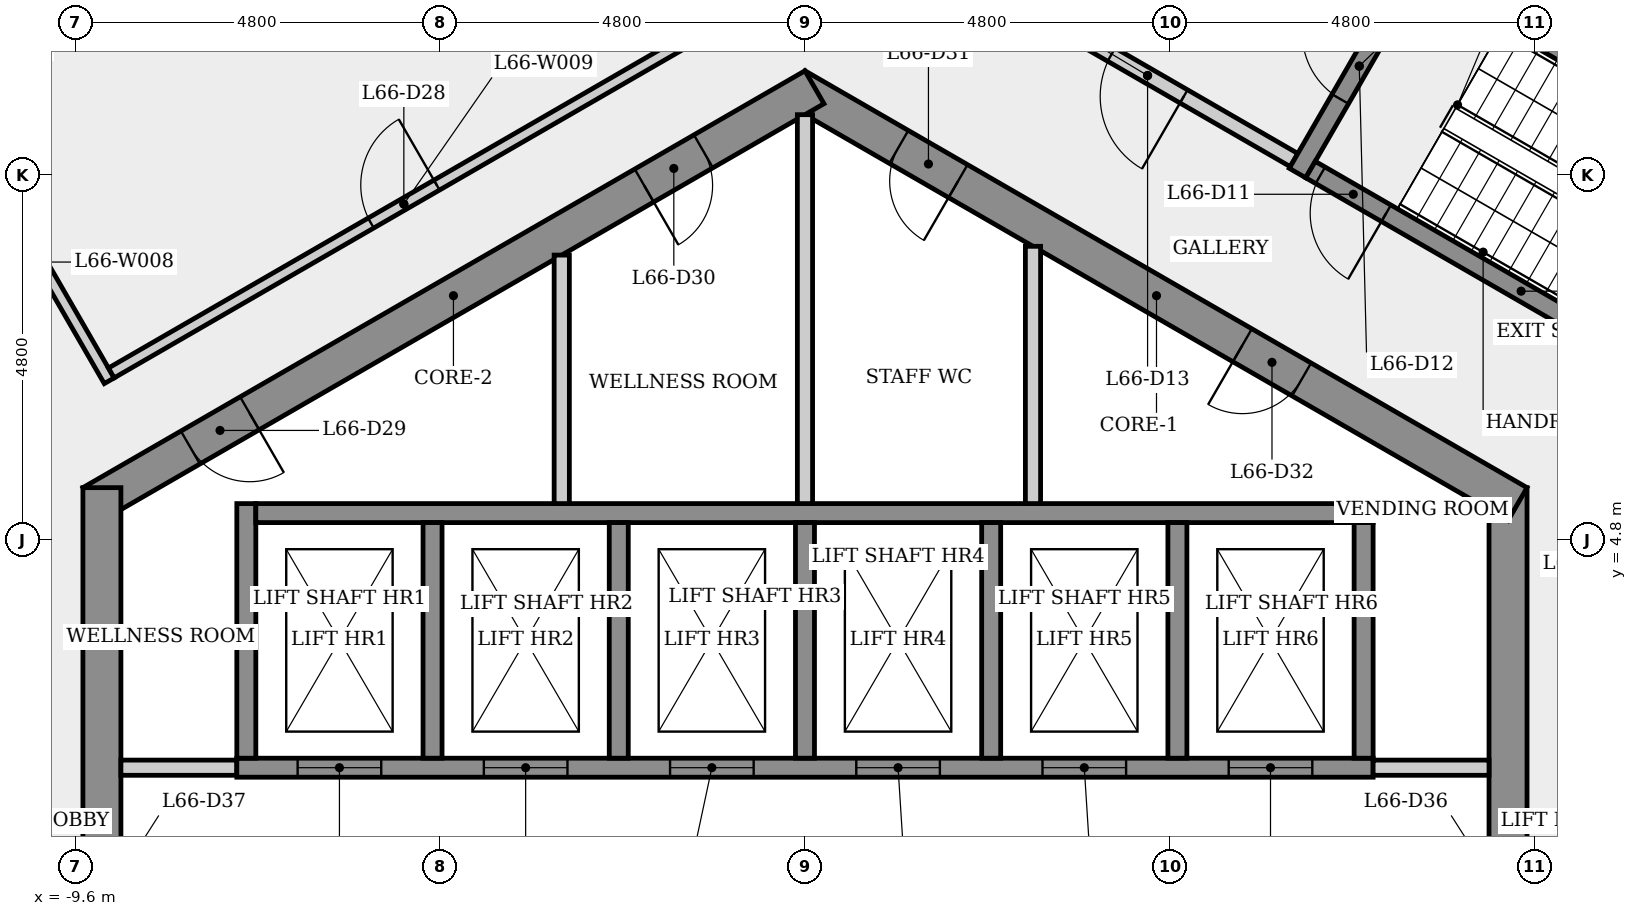
"""IFC4 building model, lengths in metres.
Left out: names, types, materials, properties, quantities, classifications, styles, units other than length and angle.
Written with IfcOpenShell. Run it as: python <this file> out.ifc"""

import sys

from ifc_helpers import new_model, si_unit, direction, frame, frame_2d, origin, place, context, subcontext, project, spatial, rectangle, extrude, element, fill, save


model = new_model("IFC4")
c1 = context("Model", 3, precision=1e-05, world=origin(), true_north=direction((0.0, 1.0)))
c2 = subcontext(c1, "Body", "Model", "MODEL_VIEW")
j1 = project(units=[si_unit("LENGTHUNIT", "METRE"), si_unit("PLANEANGLEUNIT", "RADIAN")], contexts=[c1])
p1 = place(None, origin())
s1 = spatial("IfcSite", under=j1, at=p1, CompositionType="ELEMENT")
p2 = place(p1, origin())
s2 = spatial("IfcBuilding", under=s1, at=p2, CompositionType="ELEMENT")
p3 = place(p2, frame((0.0, 0.0, 246.1)))
s3 = spatial("IfcBuildingStorey", under=s2, at=p3, CompositionType="ELEMENT", Elevation=246.1)
p4 = place(p3, frame((9.25, -5.485, 0.0), z_axis=(0.0, 0.0, 1.0), x_axis=(0.0, 1.0, 0.0)))
e1 = element("IfcWall", 1, at=p4, inside=s3, PredefinedType="SHEAR", context=c2, shape_type="SweptSolid", body=[
    extrude(rectangle(XDim=10.97, YDim=0.5, at=frame_2d((5.485, 0.0))), origin(), (0.0, 0.0, 1.0), 3.4),
])
p5 = place(p4, frame((4.685, 0.0, 0.0)))
e2 = element("IfcOpeningElement", 2, at=p5, cuts=e1, PredefinedType="OPENING", context=c2, shape_type="SweptSolid", body=[
    extrude(rectangle(XDim=1.6, YDim=2.1, at=frame_2d((0.8, 1.05))), frame((0.0, 0.26, 0.0), z_axis=(0.0, -1.0, 0.0), x_axis=(1.0, 0.0, 0.0)), (0.0, 0.0, 1.0), 0.52),
])
p6 = place(p3, frame((9.375, 5.268, 0.0), z_axis=(0.0, 0.0, 1.0), x_axis=(-0.866023993627, 0.500002442456, 0.0)))
e3 = element("IfcWall", 3, at=p6, inside=s3, PredefinedType="SHEAR", context=c2, shape_type="SweptSolid", body=[
    extrude(rectangle(XDim=10.97, YDim=0.5, at=frame_2d((5.485, 0.0))), origin(), (0.0, 0.0, 1.0), 3.4),
])
p7 = place(p6, frame((8.5, 0.0, 0.0)))
e4 = element("IfcOpeningElement", 4, at=p7, cuts=e3, PredefinedType="OPENING", context=c2, shape_type="SweptSolid", body=[
    extrude(rectangle(XDim=0.9, YDim=2.1, at=frame_2d((0.45, 1.05))), frame((0.0, 0.26, 0.0), z_axis=(0.0, -1.0, 0.0), x_axis=(1.0, 0.0, 0.0)), (0.0, 0.0, 1.0), 0.52),
])
p8 = place(p6, frame((3.28, 0.0, 0.0)))
e5 = element("IfcOpeningElement", 5, at=p8, cuts=e3, PredefinedType="OPENING", context=c2, shape_type="SweptSolid", body=[
    extrude(rectangle(XDim=0.9, YDim=2.1, at=frame_2d((0.45, 1.05))), frame((0.0, 0.26, 0.0), z_axis=(0.0, -1.0, 0.0), x_axis=(1.0, 0.0, 0.0)), (0.0, 0.0, 1.0), 0.52),
])
p9 = place(p3, frame((0.125, 10.753, 0.0), z_axis=(0.0, 0.0, 1.0), x_axis=(-0.866023993627, -0.500002442456, 0.0)))
e6 = element("IfcWall", 6, at=p9, inside=s3, PredefinedType="SHEAR", context=c2, shape_type="SweptSolid", body=[
    extrude(rectangle(XDim=10.97, YDim=0.5, at=frame_2d((5.485, 0.0))), origin(), (0.0, 0.0, 1.0), 3.4),
])
p10 = place(p9, frame((8.581, 0.0, 0.0)))
e7 = element("IfcOpeningElement", 7, at=p10, cuts=e6, PredefinedType="OPENING", context=c2, shape_type="SweptSolid", body=[
    extrude(rectangle(XDim=0.9, YDim=2.1, at=frame_2d((0.45, 1.05))), frame((0.0, 0.26, 0.0), z_axis=(0.0, -1.0, 0.0), x_axis=(1.0, 0.0, 0.0)), (0.0, 0.0, 1.0), 0.52),
])
p11 = place(p9, frame((1.687, 0.0, 0.0)))
e8 = element("IfcOpeningElement", 8, at=p11, cuts=e6, PredefinedType="OPENING", context=c2, shape_type="SweptSolid", body=[
    extrude(rectangle(XDim=0.9, YDim=2.1, at=frame_2d((0.45, 1.05))), frame((0.0, 0.26, 0.0), z_axis=(0.0, -1.0, 0.0), x_axis=(1.0, 0.0, 0.0)), (0.0, 0.0, 1.0), 0.52),
])
p12 = place(p3, frame((-9.25, 5.485, 0.0), z_axis=(0.0, 0.0, 1.0), x_axis=(0.0, -1.0, 0.0)))
e9 = element("IfcWall", 9, at=p12, inside=s3, PredefinedType="SHEAR", context=c2, shape_type="SweptSolid", body=[
    extrude(rectangle(XDim=10.97, YDim=0.5, at=frame_2d((5.485, 0.0))), origin(), (0.0, 0.0, 1.0), 3.4),
])
p13 = place(p12, frame((8.51, 0.0, 0.0)))
e10 = element("IfcOpeningElement", 10, at=p13, cuts=e9, PredefinedType="OPENING", context=c2, shape_type="SweptSolid", body=[
    extrude(rectangle(XDim=0.9, YDim=2.1, at=frame_2d((0.45, 1.05))), frame((0.0, 0.26, 0.0), z_axis=(0.0, -1.0, 0.0), x_axis=(1.0, 0.0, 0.0)), (0.0, 0.0, 1.0), 0.52),
])
p14 = place(p12, frame((4.685, 0.0, 0.0)))
e11 = element("IfcOpeningElement", 11, at=p14, cuts=e9, PredefinedType="OPENING", context=c2, shape_type="SweptSolid", body=[
    extrude(rectangle(XDim=1.6, YDim=2.1, at=frame_2d((0.8, 1.05))), frame((0.0, 0.26, 0.0), z_axis=(0.0, -1.0, 0.0), x_axis=(1.0, 0.0, 0.0)), (0.0, 0.0, 1.0), 0.52),
])
p15 = place(p3, frame((-10.957, 10.015, 0.0), z_axis=(0.0, 0.0, 1.0), x_axis=(0.500019324569, -0.866014246452, 0.0)))
e12 = element("IfcWall", 12, at=p15, inside=s3, PredefinedType="PARTITIONING", context=c2, shape_type="SweptSolid", body=[
    extrude(rectangle(XDim=3.607, YDim=0.15, at=frame_2d((1.803, 0.0))), origin(), (0.0, 0.0, 1.0), 3.05),
])
p16 = place(p3, frame((-9.126, 6.994, 0.0), z_axis=(0.0, 0.0, 1.0), x_axis=(0.866030533695, 0.499991114629, 0.0)))
e13 = element("IfcWall", 13, at=p16, inside=s3, PredefinedType="PARTITIONING", context=c2, shape_type="SweptSolid", body=[
    extrude(rectangle(XDim=8.889, YDim=0.15, at=frame_2d((4.444, 0.0))), origin(), (0.0, 0.0, 1.0), 3.05),
])
p17 = place(p16, frame((3.944, 0.0, 0.0)))
e14 = element("IfcOpeningElement", 14, at=p17, cuts=e13, PredefinedType="OPENING", context=c2, shape_type="SweptSolid", body=[
    extrude(rectangle(XDim=1.0, YDim=2.1, at=frame_2d((0.5, 1.05))), frame((0.0, 0.085, 0.0), z_axis=(0.0, -1.0, 0.0), x_axis=(1.0, 0.0, 0.0)), (0.0, 0.0, 1.0), 0.17),
])
p18 = place(p3, frame((-9.0, 1.8, 0.0), z_axis=(0.0, 0.0, 1.0), x_axis=(1.0, 0.0, 0.0)))
e15 = element("IfcWall", 15, at=p18, inside=s3, PredefinedType="PARTITIONING", context=c2, shape_type="SweptSolid", body=[
    extrude(rectangle(XDim=1.525, YDim=0.2, at=frame_2d((0.763, 0.0))), origin(), (0.0, 0.0, 1.0), 3.05),
])
p19 = place(p3, frame((-7.475, 1.8, 0.0), z_axis=(0.0, 0.0, 1.0), x_axis=(1.0, 0.0, 0.0)))
e16 = element("IfcWall", 16, at=p19, inside=s3, PredefinedType="SHEAR", context=c2, shape_type="SweptSolid", body=[
    extrude(rectangle(XDim=14.95, YDim=0.25, at=frame_2d((7.475, 0.0))), origin(), (0.0, 0.0, 1.0), 3.05),
])
p20 = place(p19, frame((0.8, 0.0, 0.0)))
e17 = element("IfcOpeningElement", 17, at=p20, cuts=e16, PredefinedType="OPENING", context=c2, shape_type="SweptSolid", body=[
    extrude(rectangle(XDim=1.1, YDim=2.1, at=frame_2d((0.55, 1.05))), frame((0.0, 0.135, 0.0), z_axis=(0.0, -1.0, 0.0), x_axis=(1.0, 0.0, 0.0)), (0.0, 0.0, 1.0), 0.27),
])
p21 = place(p19, frame((3.25, 0.0, 0.0)))
e18 = element("IfcOpeningElement", 18, at=p21, cuts=e16, PredefinedType="OPENING", context=c2, shape_type="SweptSolid", body=[
    extrude(rectangle(XDim=1.1, YDim=2.1, at=frame_2d((0.55, 1.05))), frame((0.0, 0.135, 0.0), z_axis=(0.0, -1.0, 0.0), x_axis=(1.0, 0.0, 0.0)), (0.0, 0.0, 1.0), 0.27),
])
p22 = place(p19, frame((5.7, 0.0, 0.0)))
e19 = element("IfcOpeningElement", 19, at=p22, cuts=e16, PredefinedType="OPENING", context=c2, shape_type="SweptSolid", body=[
    extrude(rectangle(XDim=1.1, YDim=2.1, at=frame_2d((0.55, 1.05))), frame((0.0, 0.135, 0.0), z_axis=(0.0, -1.0, 0.0), x_axis=(1.0, 0.0, 0.0)), (0.0, 0.0, 1.0), 0.27),
])
p23 = place(p19, frame((8.15, 0.0, 0.0)))
e20 = element("IfcOpeningElement", 20, at=p23, cuts=e16, PredefinedType="OPENING", context=c2, shape_type="SweptSolid", body=[
    extrude(rectangle(XDim=1.1, YDim=2.1, at=frame_2d((0.55, 1.05))), frame((0.0, 0.135, 0.0), z_axis=(0.0, -1.0, 0.0), x_axis=(1.0, 0.0, 0.0)), (0.0, 0.0, 1.0), 0.27),
])
p24 = place(p19, frame((10.6, 0.0, 0.0)))
e21 = element("IfcOpeningElement", 21, at=p24, cuts=e16, PredefinedType="OPENING", context=c2, shape_type="SweptSolid", body=[
    extrude(rectangle(XDim=1.1, YDim=2.1, at=frame_2d((0.55, 1.05))), frame((0.0, 0.135, 0.0), z_axis=(0.0, -1.0, 0.0), x_axis=(1.0, 0.0, 0.0)), (0.0, 0.0, 1.0), 0.27),
])
p25 = place(p19, frame((13.05, 0.0, 0.0)))
e22 = element("IfcOpeningElement", 22, at=p25, cuts=e16, PredefinedType="OPENING", context=c2, shape_type="SweptSolid", body=[
    extrude(rectangle(XDim=1.1, YDim=2.1, at=frame_2d((0.55, 1.05))), frame((0.0, 0.135, 0.0), z_axis=(0.0, -1.0, 0.0), x_axis=(1.0, 0.0, 0.0)), (0.0, 0.0, 1.0), 0.27),
])
p26 = place(p3, frame((-7.35, 1.925, 0.0), z_axis=(0.0, 0.0, 1.0), x_axis=(0.0, 1.0, 0.0)))
e23 = element("IfcWall", 23, at=p26, inside=s3, PredefinedType="SHEAR", context=c2, shape_type="SweptSolid", body=[
    extrude(rectangle(XDim=3.35, YDim=0.25, at=frame_2d((1.675, 0.0))), origin(), (0.0, 0.0, 1.0), 3.05),
])
p27 = place(p3, frame((-7.225, 5.15, 0.0), z_axis=(0.0, 0.0, 1.0), x_axis=(1.0, 0.0, 0.0)))
e24 = element("IfcWall", 24, at=p27, inside=s3, PredefinedType="SHEAR", context=c2, shape_type="SweptSolid", body=[
    extrude(rectangle(XDim=14.7, YDim=0.25, at=frame_2d((7.35, 0.0))), origin(), (0.0, 0.0, 1.0), 3.05),
])
p28 = place(p3, frame((-4.9, 5.025, 0.0), z_axis=(0.0, 0.0, 1.0), x_axis=(0.0, -1.0, 0.0)))
e25 = element("IfcWall", 25, at=p28, inside=s3, PredefinedType="SHEAR", context=c2, shape_type="SweptSolid", body=[
    extrude(rectangle(XDim=3.1, YDim=0.25, at=frame_2d((1.55, 0.0))), origin(), (0.0, 0.0, 1.0), 3.4),
])
p29 = place(p3, frame((-3.2, 8.545, 0.0), z_axis=(0.0, 0.0, 1.0), x_axis=(0.0, -1.0, 0.0)))
e26 = element("IfcWall", 26, at=p29, inside=s3, PredefinedType="PARTITIONING", context=c2, shape_type="SweptSolid", body=[
    extrude(rectangle(XDim=3.27, YDim=0.2, at=frame_2d((1.635, 0.0))), origin(), (0.0, 0.0, 1.0), 3.05),
])
for number, where, z_axis, x_axis in (
    (27, (-2.45, 5.025, 0.0), (0.0, 0.0, 1.0), (0.0, -1.0, 0.0)),
    (28, (0.0, 5.025, 0.0), (0.0, 0.0, 1.0), (0.0, -1.0, 0.0)),
):
    element("IfcWall", number, at=place(p3, frame(where, z_axis=z_axis, x_axis=x_axis)), inside=s3, PredefinedType="SHEAR", context=c2, shape_type="SweptSolid", body=[
        extrude(rectangle(XDim=3.1, YDim=0.25, at=frame_2d((1.55, 0.0))), origin(), (0.0, 0.0, 1.0), 3.4),
    ])
p30 = place(p3, frame((0.0, 10.392, 0.0), z_axis=(0.0, 0.0, 1.0), x_axis=(0.0, -1.0, 0.0)))
e29 = element("IfcWall", 29, at=p30, inside=s3, PredefinedType="PARTITIONING", context=c2, shape_type="SweptSolid", body=[
    extrude(rectangle(XDim=5.117, YDim=0.2, at=frame_2d((2.559, 0.0))), origin(), (0.0, 0.0, 1.0), 3.05),
])
p31 = place(p3, frame((2.45, 5.025, 0.0), z_axis=(0.0, 0.0, 1.0), x_axis=(0.0, -1.0, 0.0)))
e30 = element("IfcWall", 30, at=p31, inside=s3, PredefinedType="SHEAR", context=c2, shape_type="SweptSolid", body=[
    extrude(rectangle(XDim=3.1, YDim=0.25, at=frame_2d((1.55, 0.0))), origin(), (0.0, 0.0, 1.0), 3.4),
])
p32 = place(p3, frame((3.0, 8.66, 0.0), z_axis=(0.0, 0.0, 1.0), x_axis=(0.0, -1.0, 0.0)))
e31 = element("IfcWall", 31, at=p32, inside=s3, PredefinedType="PARTITIONING", context=c2, shape_type="SweptSolid", body=[
    extrude(rectangle(XDim=3.385, YDim=0.2, at=frame_2d((1.693, 0.0))), origin(), (0.0, 0.0, 1.0), 3.05),
])
p33 = place(p3, frame((4.9, 5.025, 0.0), z_axis=(0.0, 0.0, 1.0), x_axis=(0.0, -1.0, 0.0)))
e32 = element("IfcWall", 32, at=p33, inside=s3, PredefinedType="SHEAR", context=c2, shape_type="SweptSolid", body=[
    extrude(rectangle(XDim=3.1, YDim=0.25, at=frame_2d((1.55, 0.0))), origin(), (0.0, 0.0, 1.0), 3.4),
])
p34 = place(p3, frame((6.435, 9.795, 0.0), z_axis=(0.0, 0.0, 1.0), x_axis=(-0.866012907634, 0.500021643343, 0.0)))
e33 = element("IfcWall", 33, at=p34, inside=s3, PredefinedType="PARTITIONING", context=c2, shape_type="SweptSolid", body=[
    extrude(rectangle(XDim=4.45, YDim=0.2, at=frame_2d((2.225, 0.0))), origin(), (0.0, 0.0, 1.0), 3.05),
])
p35 = place(p34, frame((1.675, 0.0, 0.0)))
e34 = element("IfcOpeningElement", 34, at=p35, cuts=e33, PredefinedType="OPENING", context=c2, shape_type="SweptSolid", body=[
    extrude(rectangle(XDim=1.1, YDim=2.1, at=frame_2d((0.55, 1.05))), frame((0.0, 0.11, 0.0), z_axis=(0.0, -1.0, 0.0), x_axis=(1.0, 0.0, 0.0)), (0.0, 0.0, 1.0), 0.22),
])
p36 = place(p3, frame((6.48, 9.624, 0.0), z_axis=(0.0, 0.0, 1.0), x_axis=(0.500017246033, 0.866015446554, 0.0)))
e35 = element("IfcWall", 35, at=p36, inside=s3, PredefinedType="SHEAR", context=c2, shape_type="SweptSolid", body=[
    extrude(rectangle(XDim=3.25, YDim=0.25, at=frame_2d((1.625, 0.0))), origin(), (0.0, 0.0, 1.0), 3.05),
])
p37 = place(p36, frame((1.125, 0.0, 0.0)))
e36 = element("IfcOpeningElement", 36, at=p37, cuts=e35, PredefinedType="OPENING", context=c2, shape_type="SweptSolid", body=[
    extrude(rectangle(XDim=1.0, YDim=2.1, at=frame_2d((0.5, 1.05))), frame((0.0, 0.135, 0.0), z_axis=(0.0, -1.0, 0.0), x_axis=(1.0, 0.0, 0.0)), (0.0, 0.0, 1.0), 0.27),
])
p38 = place(p3, frame((7.475, 1.8, 0.0), z_axis=(0.0, 0.0, 1.0), x_axis=(1.0, 0.0, 0.0)))
e37 = element("IfcWall", 37, at=p38, inside=s3, PredefinedType="PARTITIONING", context=c2, shape_type="SweptSolid", body=[
    extrude(rectangle(XDim=1.525, YDim=0.2, at=frame_2d((0.763, 0.0))), origin(), (0.0, 0.0, 1.0), 3.05),
])
p39 = place(p3, frame((7.35, 5.025, 0.0), z_axis=(0.0, 0.0, 1.0), x_axis=(0.0, -1.0, 0.0)))
e38 = element("IfcWall", 38, at=p39, inside=s3, PredefinedType="SHEAR", context=c2, shape_type="SweptSolid", body=[
    extrude(rectangle(XDim=3.1, YDim=0.25, at=frame_2d((1.55, 0.0))), origin(), (0.0, 0.0, 1.0), 3.4),
])
p40 = place(p3, frame((8.151, 12.268, 0.0), z_axis=(0.0, 0.0, 1.0), x_axis=(0.866025499775, -0.499999833739, 0.0)))
e39 = element("IfcWall", 39, at=p40, inside=s3, PredefinedType="SHEAR", context=c2, shape_type="SweptSolid", body=[
    extrude(rectangle(XDim=6.4, YDim=0.25, at=frame_2d((3.2, 0.0))), origin(), (0.0, 0.0, 1.0), 3.05),
])
p41 = place(p3, frame((12.194, 6.47, 0.0), z_axis=(0.0, 0.0, 1.0), x_axis=(-0.866025499775, 0.499999833739, 0.0)))
e40 = element("IfcWall", 40, at=p41, inside=s3, PredefinedType="SHEAR", context=c2, shape_type="SweptSolid", body=[
    extrude(rectangle(XDim=6.4, YDim=0.25, at=frame_2d((3.2, 0.0))), origin(), (0.0, 0.0, 1.0), 3.05),
])
p42 = place(p41, frame((5.25, 0.0, 0.0)))
e41 = element("IfcOpeningElement", 41, at=p42, cuts=e40, PredefinedType="OPENING", context=c2, shape_type="SweptSolid", body=[
    extrude(rectangle(XDim=1.0, YDim=2.1, at=frame_2d((0.5, 1.05))), frame((0.0, 0.135, 0.0), z_axis=(0.0, -1.0, 0.0), x_axis=(1.0, 0.0, 0.0)), (0.0, 0.0, 1.0), 0.27),
])
p43 = place(p20, origin())
e42 = element("IfcDoor", 42, at=p43, inside=s3, OperationType="SLIDING_TO_LEFT", PredefinedType="DOOR", context=c2, shape_type="SweptSolid", body=[
    extrude(rectangle(XDim=1.1, YDim=2.1, at=frame_2d((0.55, 1.05))), frame((0.0, 0.025, 0.0), z_axis=(0.0, -1.0, 0.0), x_axis=(1.0, 0.0, 0.0)), (0.0, 0.0, 1.0), 0.05),
])
fill(e17, e42)
p44 = place(p21, origin())
e43 = element("IfcDoor", 43, at=p44, inside=s3, OperationType="SLIDING_TO_LEFT", PredefinedType="DOOR", context=c2, shape_type="SweptSolid", body=[
    extrude(rectangle(XDim=1.1, YDim=2.1, at=frame_2d((0.55, 1.05))), frame((0.0, 0.025, 0.0), z_axis=(0.0, -1.0, 0.0), x_axis=(1.0, 0.0, 0.0)), (0.0, 0.0, 1.0), 0.05),
])
fill(e18, e43)
p45 = place(p22, origin())
e44 = element("IfcDoor", 44, at=p45, inside=s3, OperationType="SLIDING_TO_LEFT", PredefinedType="DOOR", context=c2, shape_type="SweptSolid", body=[
    extrude(rectangle(XDim=1.1, YDim=2.1, at=frame_2d((0.55, 1.05))), frame((0.0, 0.025, 0.0), z_axis=(0.0, -1.0, 0.0), x_axis=(1.0, 0.0, 0.0)), (0.0, 0.0, 1.0), 0.05),
])
fill(e19, e44)
p46 = place(p23, origin())
e45 = element("IfcDoor", 45, at=p46, inside=s3, OperationType="SLIDING_TO_LEFT", PredefinedType="DOOR", context=c2, shape_type="SweptSolid", body=[
    extrude(rectangle(XDim=1.1, YDim=2.1, at=frame_2d((0.55, 1.05))), frame((0.0, 0.025, 0.0), z_axis=(0.0, -1.0, 0.0), x_axis=(1.0, 0.0, 0.0)), (0.0, 0.0, 1.0), 0.05),
])
fill(e20, e45)
p47 = place(p24, origin())
e46 = element("IfcDoor", 46, at=p47, inside=s3, OperationType="SLIDING_TO_LEFT", PredefinedType="DOOR", context=c2, shape_type="SweptSolid", body=[
    extrude(rectangle(XDim=1.1, YDim=2.1, at=frame_2d((0.55, 1.05))), frame((0.0, 0.025, 0.0), z_axis=(0.0, -1.0, 0.0), x_axis=(1.0, 0.0, 0.0)), (0.0, 0.0, 1.0), 0.05),
])
fill(e21, e46)
p48 = place(p25, origin())
e47 = element("IfcDoor", 47, at=p48, inside=s3, OperationType="SLIDING_TO_LEFT", PredefinedType="DOOR", context=c2, shape_type="SweptSolid", body=[
    extrude(rectangle(XDim=1.1, YDim=2.1, at=frame_2d((0.55, 1.05))), frame((0.0, 0.025, 0.0), z_axis=(0.0, -1.0, 0.0), x_axis=(1.0, 0.0, 0.0)), (0.0, 0.0, 1.0), 0.05),
])
fill(e22, e47)
p49 = place(p42, origin())
e48 = element("IfcDoor", 48, at=p49, inside=s3, OperationType="SINGLE_SWING_LEFT", PredefinedType="DOOR", context=c2, shape_type="SweptSolid", body=[
    extrude(rectangle(XDim=1.0, YDim=2.1, at=frame_2d((0.5, 1.05))), frame((0.0, 0.025, 0.0), z_axis=(0.0, -1.0, 0.0), x_axis=(1.0, 0.0, 0.0)), (0.0, 0.0, 1.0), 0.05),
])
fill(e41, e48)
p50 = place(p37, origin())
e49 = element("IfcDoor", 49, at=p50, inside=s3, OperationType="SINGLE_SWING_RIGHT", PredefinedType="DOOR", context=c2, shape_type="SweptSolid", body=[
    extrude(rectangle(XDim=1.0, YDim=2.1, at=frame_2d((0.5, 1.05))), frame((0.0, 0.025, 0.0), z_axis=(0.0, -1.0, 0.0), x_axis=(1.0, 0.0, 0.0)), (0.0, 0.0, 1.0), 0.05),
])
fill(e36, e49)
p51 = place(p35, origin())
e50 = element("IfcDoor", 50, at=p51, inside=s3, OperationType="SINGLE_SWING_LEFT", PredefinedType="DOOR", context=c2, shape_type="SweptSolid", body=[
    extrude(rectangle(XDim=1.1, YDim=2.1, at=frame_2d((0.55, 1.05))), frame((0.0, 0.025, 0.0), z_axis=(0.0, -1.0, 0.0), x_axis=(1.0, 0.0, 0.0)), (0.0, 0.0, 1.0), 0.05),
])
fill(e34, e50)
p52 = place(p17, origin())
e51 = element("IfcDoor", 51, at=p52, inside=s3, OperationType="SINGLE_SWING_RIGHT", PredefinedType="DOOR", context=c2, shape_type="SweptSolid", body=[
    extrude(rectangle(XDim=1.0, YDim=2.1, at=frame_2d((0.5, 1.05))), frame((0.0, 0.025, 0.0), z_axis=(0.0, -1.0, 0.0), x_axis=(1.0, 0.0, 0.0)), (0.0, 0.0, 1.0), 0.05),
])
fill(e14, e51)
p53 = place(p10, origin())
e52 = element("IfcDoor", 52, at=p53, inside=s3, OperationType="SINGLE_SWING_LEFT", PredefinedType="DOOR", context=c2, shape_type="SweptSolid", body=[
    extrude(rectangle(XDim=0.9, YDim=2.1, at=frame_2d((0.45, 1.05))), frame((0.0, 0.025, 0.0), z_axis=(0.0, -1.0, 0.0), x_axis=(1.0, 0.0, 0.0)), (0.0, 0.0, 1.0), 0.05),
])
fill(e7, e52)
p54 = place(p11, origin())
e53 = element("IfcDoor", 53, at=p54, inside=s3, OperationType="SINGLE_SWING_RIGHT", PredefinedType="DOOR", context=c2, shape_type="SweptSolid", body=[
    extrude(rectangle(XDim=0.9, YDim=2.1, at=frame_2d((0.45, 1.05))), frame((0.0, 0.025, 0.0), z_axis=(0.0, -1.0, 0.0), x_axis=(1.0, 0.0, 0.0)), (0.0, 0.0, 1.0), 0.05),
])
fill(e8, e53)
p55 = place(p7, origin())
e54 = element("IfcDoor", 54, at=p55, inside=s3, OperationType="SINGLE_SWING_LEFT", PredefinedType="DOOR", context=c2, shape_type="SweptSolid", body=[
    extrude(rectangle(XDim=0.9, YDim=2.1, at=frame_2d((0.45, 1.05))), frame((0.0, 0.025, 0.0), z_axis=(0.0, -1.0, 0.0), x_axis=(1.0, 0.0, 0.0)), (0.0, 0.0, 1.0), 0.05),
])
fill(e4, e54)
p56 = place(p8, origin())
e55 = element("IfcDoor", 55, at=p56, inside=s3, OperationType="SINGLE_SWING_RIGHT", PredefinedType="DOOR", context=c2, shape_type="SweptSolid", body=[
    extrude(rectangle(XDim=0.9, YDim=2.1, at=frame_2d((0.45, 1.05))), frame((0.0, 0.025, 0.0), z_axis=(0.0, -1.0, 0.0), x_axis=(1.0, 0.0, 0.0)), (0.0, 0.0, 1.0), 0.05),
])
fill(e5, e55)
save(model, sys.argv[1])
